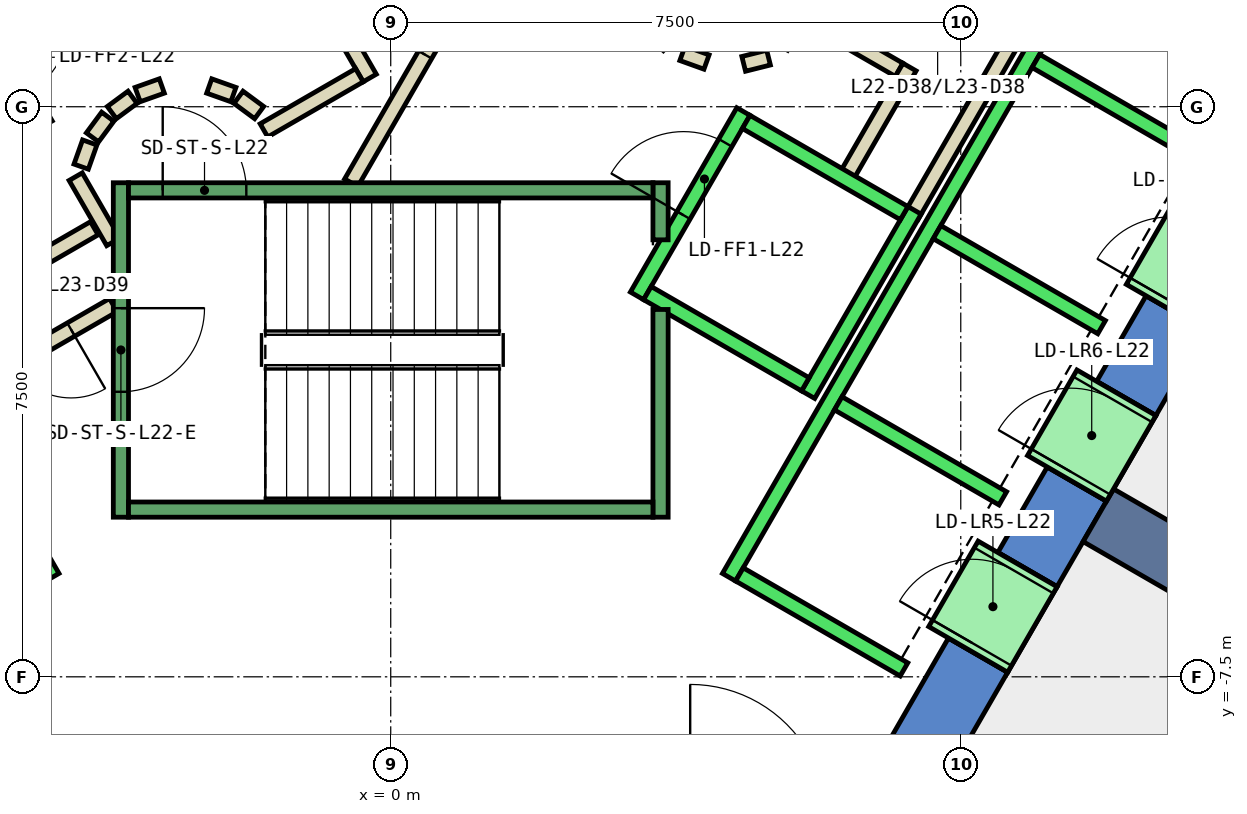
"""IFC4 building model, lengths in metres.
Left out: names, types, materials, properties, quantities, classifications, styles, units other than length and angle.
Written with IfcOpenShell. Run it as: python <this file> out.ifc"""

import sys

from ifc_helpers import new_model, si_unit, direction, frame, frame_2d, origin, place, context, subcontext, project, spatial, polyline, rectangle, outline, extrude, element, fill, save


model = new_model("IFC4")
c1 = context("Model", 3, precision=1e-05, world=origin(), true_north=direction((0.0, 1.0)))
c2 = subcontext(c1, "Body", "Model", "MODEL_VIEW")
j1 = project(units=[si_unit("LENGTHUNIT", "METRE"), si_unit("PLANEANGLEUNIT", "RADIAN")], contexts=[c1])
p1 = place(None, origin())
s1 = spatial("IfcSite", under=j1, at=p1, CompositionType="ELEMENT")
p2 = place(p1, origin())
s2 = spatial("IfcBuilding", under=s1, at=p2, CompositionType="ELEMENT")
p3 = place(p2, frame((0.0, 0.0, 103.4)))
s3 = spatial("IfcBuildingStorey", under=s2, at=p3, CompositionType="ELEMENT", Elevation=103.4)
p4 = place(p3, frame((0.0, 0.0, -0.4)))
e1 = element("IfcWall", 1, at=p4, inside=s3, PredefinedType="SHEAR", context=c2, shape_type="SweptSolid", body=[
    extrude(outline(polyline([(8.117, -7.44), (7.338, -6.99), (6.409, -8.6), (6.928, -9.5), (8.117, -7.44)])), origin(), (0.0, 0.0, 1.0), 4.2),
])
p5 = place(p3, frame((0.0, 0.0, -0.4)))
e2 = element("IfcWall", 2, at=p5, inside=s3, PredefinedType="SHEAR", context=c2, shape_type="SweptSolid", body=[
    extrude(outline(polyline([(9.417, -5.189), (8.638, -4.739), (7.988, -5.864), (8.767, -6.314), (9.417, -5.189)])), origin(), (0.0, 0.0, 1.0), 4.2),
])
p6 = place(p3, frame((0.0, 0.0, -0.4)))
e3 = element("IfcWall", 3, at=p6, inside=s3, PredefinedType="SHEAR", context=c2, shape_type="SweptSolid", body=[
    extrude(outline(polyline([(10.717, -2.937), (9.938, -2.487), (9.288, -3.613), (10.067, -4.063), (10.717, -2.937)])), origin(), (0.0, 0.0, 1.0), 4.2),
])
p7 = place(p3, frame((0.0, 0.0, 3.6)))
e4 = element("IfcWall", 4, at=p7, inside=s3, PredefinedType="SHEAR", context=c2, shape_type="SweptSolid", body=[
    extrude(outline(polyline([(8.767, -6.314), (7.988, -5.864), (7.338, -6.99), (8.117, -7.44), (8.767, -6.314)])), origin(), (0.0, 0.0, 1.0), 0.2),
])
p8 = place(p3, frame((0.0, 0.0, 3.6)))
e5 = element("IfcWall", 5, at=p8, inside=s3, PredefinedType="SHEAR", context=c2, shape_type="SweptSolid", body=[
    extrude(outline(polyline([(10.067, -4.063), (9.288, -3.613), (8.638, -4.739), (9.417, -5.189), (10.067, -4.063)])), origin(), (0.0, 0.0, 1.0), 0.2),
])
p9 = place(p3, frame((0.0, 0.0, 3.6)))
e6 = element("IfcWall", 6, at=p9, inside=s3, PredefinedType="SHEAR", context=c2, shape_type="SweptSolid", body=[
    extrude(outline(polyline([(11.367, -1.811), (10.588, -1.361), (9.938, -2.487), (10.717, -2.937), (11.367, -1.811)])), origin(), (0.0, 0.0, 1.0), 0.2),
])
p10 = place(p3, frame((9.31, -5.375, -0.4), z_axis=(0.0, 0.0, 1.0), x_axis=(0.866017533419, -0.500013631625, 0.0)))
e7 = element("IfcWall", 7, at=p10, inside=s3, PredefinedType="SHEAR", context=c2, shape_type="SweptSolid", body=[
    extrude(rectangle(XDim=9.0, YDim=0.8, at=frame_2d((4.5, 0.0))), origin(), (0.0, 0.0, 1.0), 4.2),
])
p11 = place(p3, frame((5.499, 1.172, 0.0), z_axis=(0.0, 0.0, 1.0), x_axis=(0.866333505267, -0.499465972466, 0.0)))
e8 = element("IfcWall", 8, at=p11, inside=s3, PredefinedType="PARTITIONING", context=c2, shape_type="SweptSolid", body=[
    extrude(rectangle(XDim=1.374, YDim=0.2, at=frame_2d((0.687, 0.0))), origin(), (0.0, 0.0, 1.0), 3.8),
])
p12 = place(p3, frame((6.826, 0.522, 0.0), z_axis=(0.0, 0.0, 1.0), x_axis=(-0.500016722714, -0.866015748706, 0.0)))
e9 = element("IfcWall", 9, at=p12, inside=s3, PredefinedType="PARTITIONING", context=c2, shape_type="SweptSolid", body=[
    extrude(rectangle(XDim=1.7, YDim=0.2, at=frame_2d((0.85, 0.0))), origin(), (0.0, 0.0, 1.0), 3.8),
])
p13 = place(p3, frame((8.192, 0.888, 0.0), z_axis=(0.0, 0.0, 1.0), x_axis=(-0.499940625693, -0.866059680843, 0.0)))
e10 = element("IfcWall", 10, at=p13, inside=s3, PredefinedType="PARTITIONING", context=c2, shape_type="SweptSolid", body=[
    extrude(rectangle(XDim=2.68, YDim=0.2, at=frame_2d((1.34, 0.0))), origin(), (0.0, 0.0, 1.0), 3.8),
])
p14 = place(p3, frame((-3.9, -1.599, 0.0), z_axis=(0.0, 0.0, 1.0), x_axis=(-0.865969445389, -0.500096910261, 0.0)))
e11 = element("IfcWall", 11, at=p14, inside=s3, PredefinedType="PARTITIONING", context=c2, shape_type="SweptSolid", body=[
    extrude(rectangle(XDim=1.373, YDim=0.2, at=frame_2d((0.687, 0.0))), origin(), (0.0, 0.0, 1.0), 3.8),
])
p15 = place(p3, frame((-3.65, -2.61, 0.0), z_axis=(0.0, 0.0, 1.0), x_axis=(-0.866072462134, -0.499918483688, 0.0)))
e12 = element("IfcWall", 12, at=p15, inside=s3, PredefinedType="PARTITIONING", context=c2, shape_type="SweptSolid", body=[
    extrude(rectangle(XDim=2.084, YDim=0.2, at=frame_2d((1.042, 0.0))), origin(), (0.0, 0.0, 1.0), 3.8),
])
p16 = place(p15, frame((0.642, 0.0, 0.0)))
e13 = element("IfcOpeningElement", 13, at=p16, cuts=e12, PredefinedType="OPENING", context=c2, shape_type="SweptSolid", body=[
    extrude(rectangle(XDim=0.9, YDim=2.1, at=frame_2d((0.45, 1.05))), frame((0.0, 0.11, 0.0), z_axis=(0.0, -1.0, 0.0), x_axis=(1.0, 0.0, 0.0)), (0.0, 0.0, 1.0), 0.22),
])
p17 = place(p3, frame((-4.145, -0.92, 0.0), z_axis=(0.0, 0.0, 1.0), x_axis=(0.499743786207, -0.866173278362, 0.0)))
e14 = element("IfcWall", 14, at=p17, inside=s3, PredefinedType="PARTITIONING", context=c2, shape_type="SweptSolid", body=[
    extrude(rectangle(XDim=0.991, YDim=0.2, at=frame_2d((0.495, 0.0))), origin(), (0.0, 0.0, 1.0), 3.8),
])
p18 = place(p3, frame((-0.52, -1.0, 0.0), z_axis=(0.0, 0.0, 1.0), x_axis=(0.50011622646, 0.865958290007, 0.0)))
e15 = element("IfcWall", 15, at=p18, inside=s3, PredefinedType="PARTITIONING", context=c2, shape_type="SweptSolid", body=[
    extrude(rectangle(XDim=4.991, YDim=0.2, at=frame_2d((2.496, 0.0))), origin(), (0.0, 0.0, 1.0), 3.8),
])
p19 = place(p18, frame((1.945, 0.0, 0.0)))
e16 = element("IfcOpeningElement", 16, at=p19, cuts=e15, PredefinedType="OPENING", context=c2, shape_type="SweptSolid", body=[
    extrude(rectangle(XDim=1.0, YDim=2.1, at=frame_2d((0.5, 1.05))), frame((0.0, 0.11, 0.0), z_axis=(0.0, -1.0, 0.0), x_axis=(1.0, 0.0, 0.0)), (0.0, 0.0, 1.0), 0.22),
])
p20 = place(p3, frame((3.838, 0.702, 0.0), z_axis=(0.0, 0.0, 1.0), x_axis=(0.941035081519, -0.338308993895, 0.0)))
e17 = element("IfcWall", 17, at=p20, inside=s3, PredefinedType="PARTITIONING", context=c2, shape_type="SweptSolid", body=[
    extrude(rectangle(XDim=0.337, YDim=0.2, at=frame_2d((0.168, 0.0))), origin(), (0.0, 0.0, 1.0), 3.8),
])
p21 = place(p3, frame((4.644, 0.564, 0.0), z_axis=(0.0, 0.0, 1.0), x_axis=(0.969929076366, 0.243387729394, 0.0)))
e18 = element("IfcWall", 18, at=p21, inside=s3, PredefinedType="PARTITIONING", context=c2, shape_type="SweptSolid", body=[
    extrude(rectangle(XDim=0.337, YDim=0.2, at=frame_2d((0.168, 0.0))), origin(), (0.0, 0.0, 1.0), 3.8),
])
p22 = place(p3, frame((-2.771, 4.7, 0.0), z_axis=(0.0, 0.0, 1.0), x_axis=(0.499969479948, -0.866043023828, 0.0)))
e19 = element("IfcWall", 19, at=p22, inside=s3, PredefinedType="PARTITIONING", context=c2, shape_type="SweptSolid", body=[
    extrude(rectangle(XDim=4.99, YDim=0.2, at=frame_2d((2.495, 0.0))), origin(), (0.0, 0.0, 1.0), 3.8),
])
p23 = place(p22, frame((1.945, 0.0, 0.0)))
e20 = element("IfcOpeningElement", 20, at=p23, cuts=e19, PredefinedType="OPENING", context=c2, shape_type="SweptSolid", body=[
    extrude(rectangle(XDim=1.0, YDim=2.1, at=frame_2d((0.5, 1.05))), frame((0.0, 0.11, 0.0), z_axis=(0.0, -1.0, 0.0), x_axis=(1.0, 0.0, 0.0)), (0.0, 0.0, 1.0), 0.22),
])
p24 = place(p3, frame((-0.412, 0.414, 0.0), z_axis=(0.0, 0.0, 1.0), x_axis=(-0.866017369001, -0.500013916395, 0.0)))
e21 = element("IfcWall", 21, at=p24, inside=s3, PredefinedType="PARTITIONING", context=c2, shape_type="SweptSolid", body=[
    extrude(rectangle(XDim=1.45, YDim=0.2, at=frame_2d((0.725, 0.0))), origin(), (0.0, 0.0, 1.0), 3.8),
])
p25 = place(p3, frame((-1.731, -0.077, 0.0), z_axis=(0.0, 0.0, 1.0), x_axis=(-0.804311165252, 0.594208338422, 0.0)))
e22 = element("IfcWall", 22, at=p25, inside=s3, PredefinedType="PARTITIONING", context=c2, shape_type="SweptSolid", body=[
    extrude(rectangle(XDim=0.338, YDim=0.2, at=frame_2d((0.169, 0.0))), origin(), (0.0, 0.0, 1.0), 3.8),
])
p26 = place(p3, frame((-2.07, 0.16, 0.0), z_axis=(0.0, 0.0, 1.0), x_axis=(-0.942199461132, 0.335052496547, 0.0)))
e23 = element("IfcWall", 23, at=p26, inside=s3, PredefinedType="PARTITIONING", context=c2, shape_type="SweptSolid", body=[
    extrude(rectangle(XDim=0.337, YDim=0.2, at=frame_2d((0.169, 0.0))), origin(), (0.0, 0.0, 1.0), 3.8),
])
p27 = place(p3, frame((-3.012, 0.273, 0.0), z_axis=(0.0, 0.0, 1.0), x_axis=(-0.942280615813, -0.334824194261, 0.0)))
e24 = element("IfcWall", 24, at=p27, inside=s3, PredefinedType="PARTITIONING", context=c2, shape_type="SweptSolid", body=[
    extrude(rectangle(XDim=0.338, YDim=0.2, at=frame_2d((0.169, 0.0))), origin(), (0.0, 0.0, 1.0), 3.8),
])
p28 = place(p3, frame((-3.397, 0.124, 0.0), z_axis=(0.0, 0.0, 1.0), x_axis=(-0.804311165252, -0.594208338422, 0.0)))
e25 = element("IfcWall", 25, at=p28, inside=s3, PredefinedType="PARTITIONING", context=c2, shape_type="SweptSolid", body=[
    extrude(rectangle(XDim=0.338, YDim=0.2, at=frame_2d((0.169, 0.0))), origin(), (0.0, 0.0, 1.0), 3.8),
])
p29 = place(p3, frame((-3.723, -0.131, 0.0), z_axis=(0.0, 0.0, 1.0), x_axis=(-0.594675113454, -0.803966112121, 0.0)))
e26 = element("IfcWall", 26, at=p29, inside=s3, PredefinedType="PARTITIONING", context=c2, shape_type="SweptSolid", body=[
    extrude(rectangle(XDim=0.338, YDim=0.2, at=frame_2d((0.169, 0.0))), origin(), (0.0, 0.0, 1.0), 3.8),
])
p30 = place(p3, frame((-3.96, -0.47, 0.0), z_axis=(0.0, 0.0, 1.0), x_axis=(-0.334824194261, -0.942280615813, 0.0)))
e27 = element("IfcWall", 27, at=p30, inside=s3, PredefinedType="PARTITIONING", context=c2, shape_type="SweptSolid", body=[
    extrude(rectangle(XDim=0.338, YDim=0.2, at=frame_2d((0.169, 0.0))), origin(), (0.0, 0.0, 1.0), 3.8),
])
p31 = place(p3, frame((12.401, -7.621, 0.0), z_axis=(0.0, 0.0, 1.0), x_axis=(-0.499983724212, -0.866034800411, 0.0)))
e28 = element("IfcWall", 28, at=p31, inside=s3, PredefinedType="PARTITIONING", context=c2, shape_type="SweptSolid", body=[
    extrude(rectangle(XDim=9.302, YDim=0.2, at=frame_2d((4.651, 0.0))), origin(), (0.0, 0.0, 1.0), 3.8),
])
p32 = place(p3, frame((-9.751, 2.99, 0.0), z_axis=(0.0, 0.0, 1.0), x_axis=(0.50000090737, -0.866024879913, 0.0)))
e29 = element("IfcWall", 29, at=p32, inside=s3, PredefinedType="STANDARD", context=c2, shape_type="SweptSolid", body=[
    extrude(rectangle(XDim=10.6, YDim=0.2, at=frame_2d((5.3, 0.0))), origin(), (0.0, 0.0, 1.0), 3.8),
])
p33 = place(p3, frame((3.24, -2.488, 0.0), z_axis=(0.0, 0.0, 1.0), x_axis=(0.49994636267, 0.866056369097, 0.0)))
e30 = element("IfcWall", 30, at=p33, inside=s3, PredefinedType="STANDARD", context=c2, shape_type="SweptSolid", body=[
    extrude(rectangle(XDim=2.8, YDim=0.2, at=frame_2d((1.4, 0.0))), origin(), (0.0, 0.0, 1.0), 3.8),
])
p34 = place(p33, frame((1.225, 0.0, 0.0)))
e31 = element("IfcOpeningElement", 31, at=p34, cuts=e30, PredefinedType="OPENING", context=c2, shape_type="SweptSolid", body=[
    extrude(rectangle(XDim=1.1, YDim=2.1, at=frame_2d((0.55, 1.05))), frame((0.0, 0.11, 0.0), z_axis=(0.0, -1.0, 0.0), x_axis=(1.0, 0.0, 0.0)), (0.0, 0.0, 1.0), 0.22),
])
p35 = place(p3, frame((5.492, -3.788, 0.0), z_axis=(0.0, 0.0, 1.0), x_axis=(0.500011755427, 0.866018616679, 0.0)))
e32 = element("IfcWall", 32, at=p35, inside=s3, PredefinedType="STANDARD", context=c2, shape_type="SweptSolid", body=[
    extrude(rectangle(XDim=2.8, YDim=0.2, at=frame_2d((1.4, 0.0))), origin(), (0.0, 0.0, 1.0), 3.8),
])
p36 = place(p3, frame((3.377, -2.452, 0.0), z_axis=(0.0, 0.0, 1.0), x_axis=(0.865955154139, -0.50012165622, 0.0)))
e33 = element("IfcWall", 33, at=p36, inside=s3, PredefinedType="STANDARD", context=c2, shape_type="SweptSolid", body=[
    extrude(rectangle(XDim=2.4, YDim=0.2, at=frame_2d((1.2, 0.0))), origin(), (0.0, 0.0, 1.0), 3.8),
])
p37 = place(p3, frame((4.677, -0.2, 0.0), z_axis=(0.0, 0.0, 1.0), x_axis=(0.865973769406, -0.500089422704, 0.0)))
e34 = element("IfcWall", 34, at=p37, inside=s3, PredefinedType="STANDARD", context=c2, shape_type="SweptSolid", body=[
    extrude(rectangle(XDim=2.399, YDim=0.2, at=frame_2d((1.2, 0.0))), origin(), (0.0, 0.0, 1.0), 3.8),
])
p38 = place(p3, frame((4.451, -6.19, 0.0), z_axis=(0.0, 0.0, 1.0), x_axis=(0.50000090737, 0.866024879913, 0.0)))
e35 = element("IfcWall", 35, at=p38, inside=s3, PredefinedType="STANDARD", context=c2, shape_type="SweptSolid", body=[
    extrude(rectangle(XDim=10.6, YDim=0.2, at=frame_2d((5.3, 0.0))), origin(), (0.0, 0.0, 1.0), 3.8),
])
for number, where, z_axis, x_axis in (
    (36, (4.588, -6.153, 0.0), (0.0, 0.0, 1.0), (0.866, -0.5, 0.0)),
    (37, (5.888, -3.902, 0.0), (0.0, 0.0, 1.0), (0.866, -0.5, 0.0)),
    (38, (7.188, -1.65, 0.0), (0.0, 0.0, 1.0), (0.866, -0.5, 0.0)),
    (39, (8.488, 0.602, 0.0), (0.0, 0.0, 1.0), (0.866, -0.5, 0.0)),
):
    element("IfcWall", number, at=place(p3, frame(where, z_axis=z_axis, x_axis=x_axis)), inside=s3, PredefinedType="STANDARD", context=c2, shape_type="SweptSolid", body=[
        extrude(rectangle(XDim=2.5, YDim=0.2, at=frame_2d((1.25, 0.0))), origin(), (0.0, 0.0, 1.0), 3.8),
    ])
p39 = place(p3, frame((7.598, -7.14, 0.0), z_axis=(0.0, 0.0, 1.0), x_axis=(0.500362116554, 0.865816234728, 0.0)))
e40 = element("IfcWall", 40, at=p39, inside=s3, PredefinedType="STANDARD", context=c2, shape_type="SweptSolid", body=[
    extrude(rectangle(XDim=1.299, YDim=1.2, at=frame_2d((0.65, 0.0))), origin(), (0.0, 0.0, 1.0), 2.4),
])
p40 = place(p39, frame((0.1, 0.0, 0.0)))
e41 = element("IfcOpeningElement", 41, at=p40, cuts=e40, PredefinedType="OPENING", context=c2, shape_type="SweptSolid", body=[
    extrude(rectangle(XDim=1.1, YDim=2.3, at=frame_2d((0.55, 1.15))), frame((0.0, 0.61, 0.0), z_axis=(0.0, -1.0, 0.0), x_axis=(1.0, 0.0, 0.0)), (0.0, 0.0, 1.0), 1.22),
])
p41 = place(p3, frame((8.898, -4.889, 0.0), z_axis=(0.0, 0.0, 1.0), x_axis=(0.500036693733, 0.866004217611, 0.0)))
e42 = element("IfcWall", 42, at=p41, inside=s3, PredefinedType="STANDARD", context=c2, shape_type="SweptSolid", body=[
    extrude(rectangle(XDim=1.3, YDim=1.2, at=frame_2d((0.65, 0.0))), origin(), (0.0, 0.0, 1.0), 2.4),
])
p42 = place(p41, frame((0.1, 0.0, 0.0)))
e43 = element("IfcOpeningElement", 43, at=p42, cuts=e42, PredefinedType="OPENING", context=c2, shape_type="SweptSolid", body=[
    extrude(rectangle(XDim=1.1, YDim=2.3, at=frame_2d((0.55, 1.15))), frame((0.0, 0.61, 0.0), z_axis=(0.0, -1.0, 0.0), x_axis=(1.0, 0.0, 0.0)), (0.0, 0.0, 1.0), 1.22),
])
p43 = place(p3, frame((10.198, -2.637, 0.0), z_axis=(0.0, 0.0, 1.0), x_axis=(0.49989585183, 0.866085525409, 0.0)))
e44 = element("IfcWall", 44, at=p43, inside=s3, PredefinedType="STANDARD", context=c2, shape_type="SweptSolid", body=[
    extrude(rectangle(XDim=1.3, YDim=1.2, at=frame_2d((0.65, 0.0))), origin(), (0.0, 0.0, 1.0), 2.4),
])
p44 = place(p43, frame((0.1, 0.0, 0.0)))
e45 = element("IfcOpeningElement", 45, at=p44, cuts=e44, PredefinedType="OPENING", context=c2, shape_type="SweptSolid", body=[
    extrude(rectangle(XDim=1.1, YDim=2.3, at=frame_2d((0.55, 1.15))), frame((0.0, 0.61, 0.0), z_axis=(0.0, -1.0, 0.0), x_axis=(1.0, 0.0, 0.0)), (0.0, 0.0, 1.0), 1.22),
])
p45 = place(p3, frame((-3.55, -1.0, 0.0), z_axis=(0.0, 0.0, 1.0), x_axis=(0.0, -1.0, 0.0)))
e46 = element("IfcWall", 46, at=p45, inside=s3, PredefinedType="STANDARD", context=c2, shape_type="SweptSolid", body=[
    extrude(rectangle(XDim=4.4, YDim=0.2, at=frame_2d((2.2, 0.0))), origin(), (0.0, 0.0, 1.0), 3.8),
])
p46 = place(p45, frame((1.65, 0.0, 0.0)))
e47 = element("IfcOpeningElement", 47, at=p46, cuts=e46, PredefinedType="OPENING", context=c2, shape_type="SweptSolid", body=[
    extrude(rectangle(XDim=1.1, YDim=2.2, at=frame_2d((0.55, 1.1))), frame((0.0, 0.11, 0.0), z_axis=(0.0, -1.0, 0.0), x_axis=(1.0, 0.0, 0.0)), (0.0, 0.0, 1.0), 0.22),
])
p47 = place(p3, frame((3.55, -2.667, 0.0), z_axis=(0.0, 0.0, 1.0), x_axis=(0.0, -1.0, 0.0)))
e48 = element("IfcWall", 48, at=p47, inside=s3, PredefinedType="STANDARD", context=c2, shape_type="SweptSolid", body=[
    extrude(rectangle(XDim=2.733, YDim=0.2, at=frame_2d((1.366, 0.0))), origin(), (0.0, 0.0, 1.0), 3.8),
])
p48 = place(p3, frame((3.55, -1.0, 0.0), z_axis=(0.0, 0.0, 1.0), x_axis=(0.0, -1.0, 0.0)))
e49 = element("IfcWall", 49, at=p48, inside=s3, PredefinedType="STANDARD", context=c2, shape_type="SweptSolid", body=[
    extrude(rectangle(XDim=0.751, YDim=0.2, at=frame_2d((0.375, 0.0))), origin(), (0.0, 0.0, 1.0), 3.8),
])
p49 = place(p3, frame((-3.45, -1.1, 0.0), z_axis=(0.0, 0.0, 1.0), x_axis=(1.0, 0.0, 0.0)))
e50 = element("IfcWall", 50, at=p49, inside=s3, PredefinedType="STANDARD", context=c2, shape_type="SweptSolid", body=[
    extrude(rectangle(XDim=6.9, YDim=0.2, at=frame_2d((3.45, 0.0))), origin(), (0.0, 0.0, 1.0), 3.8),
])
p50 = place(p49, frame((0.45, 0.0, 0.0)))
e51 = element("IfcOpeningElement", 51, at=p50, cuts=e50, PredefinedType="OPENING", context=c2, shape_type="SweptSolid", body=[
    extrude(rectangle(XDim=1.1, YDim=2.2, at=frame_2d((0.55, 1.1))), frame((0.0, 0.11, 0.0), z_axis=(0.0, -1.0, 0.0), x_axis=(1.0, 0.0, 0.0)), (0.0, 0.0, 1.0), 0.22),
])
p51 = place(p3, frame((-3.45, -5.3, 0.0), z_axis=(0.0, 0.0, 1.0), x_axis=(1.0, 0.0, 0.0)))
e52 = element("IfcWall", 52, at=p51, inside=s3, PredefinedType="STANDARD", context=c2, shape_type="SweptSolid", body=[
    extrude(rectangle(XDim=6.9, YDim=0.2, at=frame_2d((3.45, 0.0))), origin(), (0.0, 0.0, 1.0), 3.8),
])
p52 = place(p19, origin())
e53 = element("IfcDoor", 53, at=p52, inside=s3, OperationType="SINGLE_SWING_LEFT", PredefinedType="DOOR", context=c2, shape_type="SweptSolid", body=[
    extrude(rectangle(XDim=1.0, YDim=2.1, at=frame_2d((0.5, 1.05))), frame((0.0, 0.025, 0.0), z_axis=(0.0, -1.0, 0.0), x_axis=(1.0, 0.0, 0.0)), (0.0, 0.0, 1.0), 0.05),
])
fill(e16, e53)
p53 = place(p16, origin())
e54 = element("IfcDoor", 54, at=p53, inside=s3, OperationType="SINGLE_SWING_LEFT", PredefinedType="DOOR", context=c2, shape_type="SweptSolid", body=[
    extrude(rectangle(XDim=0.9, YDim=2.1, at=frame_2d((0.45, 1.05))), frame((0.0, 0.025, 0.0), z_axis=(0.0, -1.0, 0.0), x_axis=(1.0, 0.0, 0.0)), (0.0, 0.0, 1.0), 0.05),
])
fill(e13, e54)
p54 = place(p40, origin())
e55 = element("IfcDoor", 55, at=p54, inside=s3, OperationType="SLIDING_TO_LEFT", PredefinedType="DOOR", context=c2, shape_type="SweptSolid", body=[
    extrude(rectangle(XDim=1.1, YDim=2.3, at=frame_2d((0.55, 1.15))), frame((0.0, 0.025, 0.0), z_axis=(0.0, -1.0, 0.0), x_axis=(1.0, 0.0, 0.0)), (0.0, 0.0, 1.0), 0.05),
])
fill(e41, e55)
p55 = place(p42, origin())
e56 = element("IfcDoor", 56, at=p55, inside=s3, OperationType="SLIDING_TO_LEFT", PredefinedType="DOOR", context=c2, shape_type="SweptSolid", body=[
    extrude(rectangle(XDim=1.1, YDim=2.3, at=frame_2d((0.55, 1.15))), frame((0.0, 0.025, 0.0), z_axis=(0.0, -1.0, 0.0), x_axis=(1.0, 0.0, 0.0)), (0.0, 0.0, 1.0), 0.05),
])
fill(e43, e56)
p56 = place(p34, origin())
e57 = element("IfcDoor", 57, at=p56, inside=s3, OperationType="SLIDING_TO_LEFT", PredefinedType="DOOR", context=c2, shape_type="SweptSolid", body=[
    extrude(rectangle(XDim=1.1, YDim=2.1, at=frame_2d((0.55, 1.05))), frame((0.0, 0.025, 0.0), z_axis=(0.0, -1.0, 0.0), x_axis=(1.0, 0.0, 0.0)), (0.0, 0.0, 1.0), 0.05),
])
fill(e31, e57)
p57 = place(p50, origin())
e58 = element("IfcDoor", 58, at=p57, inside=s3, OperationType="SINGLE_SWING_LEFT", PredefinedType="DOOR", context=c2, shape_type="SweptSolid", body=[
    extrude(rectangle(XDim=1.1, YDim=2.2, at=frame_2d((0.55, 1.1))), frame((0.0, 0.025, 0.0), z_axis=(0.0, -1.0, 0.0), x_axis=(1.0, 0.0, 0.0)), (0.0, 0.0, 1.0), 0.05),
])
fill(e51, e58)
p58 = place(p46, origin())
e59 = element("IfcDoor", 59, at=p58, inside=s3, OperationType="SINGLE_SWING_LEFT", PredefinedType="DOOR", context=c2, shape_type="SweptSolid", body=[
    extrude(rectangle(XDim=1.1, YDim=2.2, at=frame_2d((0.55, 1.1))), frame((0.0, 0.025, 0.0), z_axis=(0.0, -1.0, 0.0), x_axis=(1.0, 0.0, 0.0)), (0.0, 0.0, 1.0), 0.05),
])
fill(e47, e59)
save(model, sys.argv[1])
